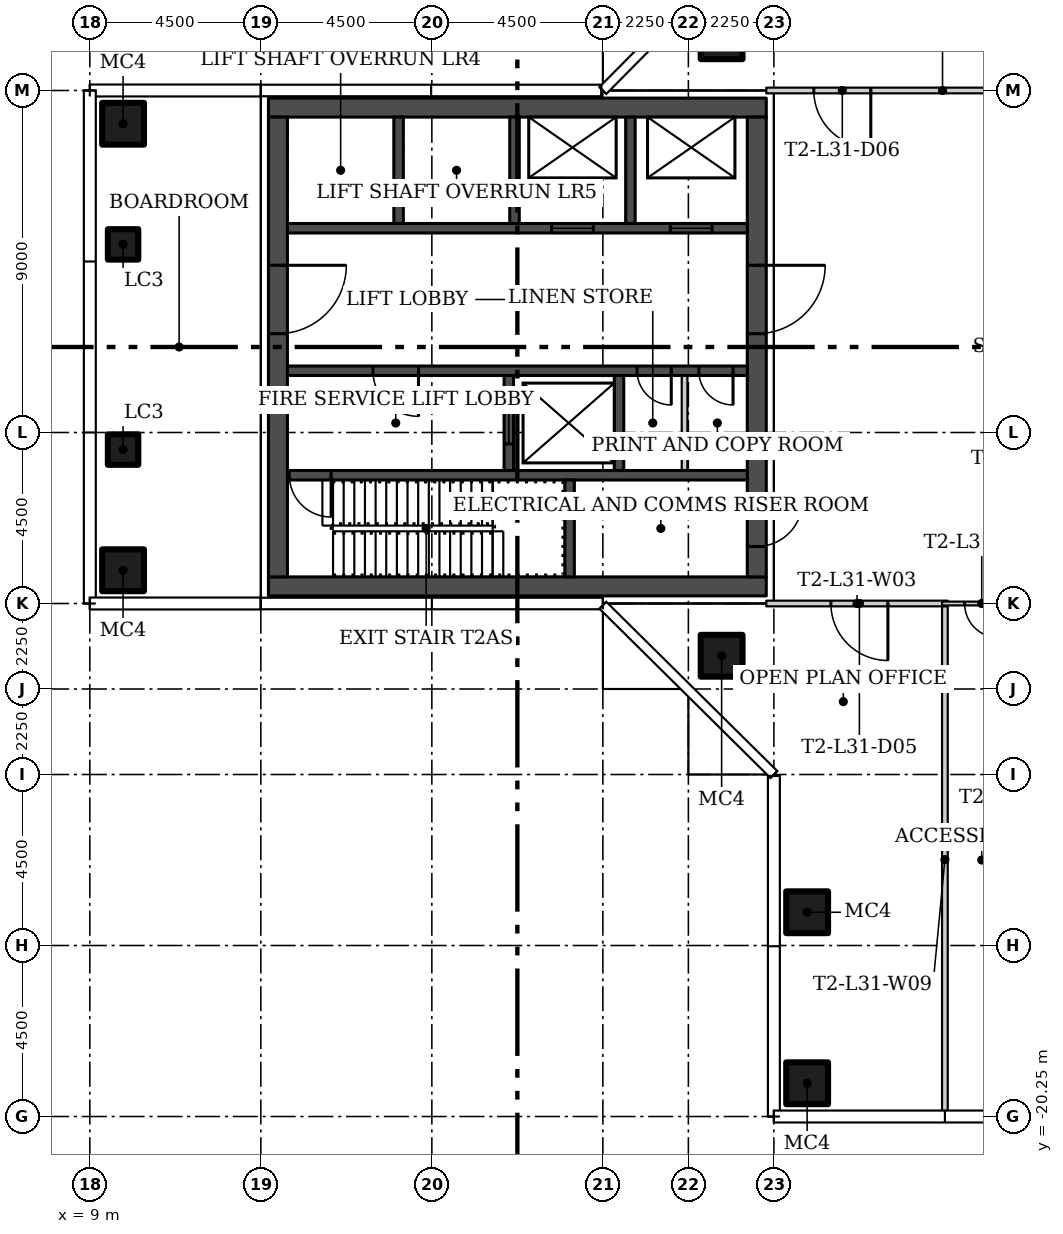
"""IFC4 building model, lengths in metres.
Left out: names, types, materials, properties, quantities, classifications, styles, units other than length and angle.
Written with IfcOpenShell. Run it as: python <this file> out.ifc"""

import sys

from ifc_helpers import new_model, si_unit, direction, frame, frame_2d, origin, origin_2d, place, context, subcontext, project, spatial, rectangle, hollow_rectangle, extrude, element, fill, save


model = new_model("IFC4")
c1 = context("Model", 3, precision=1e-05, world=origin(), true_north=direction((0.0, 1.0)))
c2 = subcontext(c1, "Body", "Model", "MODEL_VIEW")
j1 = project(units=[si_unit("LENGTHUNIT", "METRE"), si_unit("PLANEANGLEUNIT", "RADIAN")], contexts=[c1])
p1 = place(None, origin())
s1 = spatial("IfcSite", under=j1, at=p1, CompositionType="ELEMENT")
p2 = place(p1, origin())
s2 = spatial("IfcBuilding", under=s1, at=p2, CompositionType="ELEMENT")
p3 = place(p2, frame((0.0, 0.0, 133.5)))
s3 = spatial("IfcBuildingStorey", under=s2, at=p3, CompositionType="ELEMENT", Elevation=133.5)
for number, where in (
    (1, (25.625, 8.125, 0.0)),
    (2, (25.625, -8.125, 0.0)),
    (3, (27.875, -14.875, 0.0)),
    (4, (27.875, -19.375, 0.0)),
    (5, (9.875, -5.875, 0.0)),
    (6, (9.875, 5.875, 0.0)),
):
    element("IfcColumn", number, at=place(p3, frame(where)), inside=s3, PredefinedType="COLUMN", context=c2, shape_type="SweptSolid", body=[
        extrude(hollow_rectangle(XDim=1.1, YDim=1.1, WallThickness=0.04, at=origin_2d()), origin(), (0.0, 0.0, 1.0), 5.05),
    ])
for number, where in (
    (7, (9.875, -2.7, 0.0)),
    (8, (9.875, 2.7, 0.0)),
):
    element("IfcColumn", number, at=place(p3, frame(where)), inside=s3, PredefinedType="COLUMN", context=c2, shape_type="SweptSolid", body=[
        extrude(hollow_rectangle(XDim=0.8, YDim=0.8, WallThickness=0.03, at=origin_2d()), origin(), (0.0, 0.0, 1.0), 5.05),
    ])
p4 = place(p3, frame((36.075, 6.75, 0.0), z_axis=(0.0, 0.0, 1.0), x_axis=(-1.0, 0.0, 0.0)))
e9 = element("IfcWall", 9, at=p4, inside=s3, PredefinedType="PARTITIONING", context=c2, shape_type="SweptSolid", body=[
    extrude(rectangle(XDim=9.275, YDim=0.15, at=frame_2d((4.637, 0.0))), origin(), (0.0, 0.0, 1.0), 5.05),
])
p5 = place(p4, frame((6.525, 0.0, 0.0)))
e10 = element("IfcOpeningElement", 10, at=p5, cuts=e9, PredefinedType="OPENING", context=c2, shape_type="SweptSolid", body=[
    extrude(rectangle(XDim=1.5, YDim=2.1, at=frame_2d((0.75, 1.05))), frame((0.0, 0.085, 0.0), z_axis=(0.0, -1.0, 0.0), x_axis=(1.0, 0.0, 0.0)), (0.0, 0.0, 1.0), 0.17),
])
p6 = place(p4, frame((1.125, 0.0, 0.0)))
e11 = element("IfcOpeningElement", 11, at=p6, cuts=e9, PredefinedType="OPENING", context=c2, shape_type="SweptSolid", body=[
    extrude(rectangle(XDim=1.5, YDim=2.1, at=frame_2d((0.75, 1.05))), frame((0.0, 0.085, 0.0), z_axis=(0.0, -1.0, 0.0), x_axis=(1.0, 0.0, 0.0)), (0.0, 0.0, 1.0), 0.17),
])
p7 = place(p3, frame((31.575, -6.75, 0.0), z_axis=(0.0, 0.0, 1.0), x_axis=(-1.0, 0.0, 0.0)))
e12 = element("IfcWall", 12, at=p7, inside=s3, PredefinedType="PARTITIONING", context=c2, shape_type="SweptSolid", body=[
    extrude(rectangle(XDim=4.775, YDim=0.15, at=frame_2d((2.387, 0.0))), origin(), (0.0, 0.0, 1.0), 5.05),
])
p8 = place(p7, frame((1.575, 0.0, 0.0)))
e13 = element("IfcOpeningElement", 13, at=p8, cuts=e12, PredefinedType="OPENING", context=c2, shape_type="SweptSolid", body=[
    extrude(rectangle(XDim=1.5, YDim=2.1, at=frame_2d((0.75, 1.05))), frame((0.0, 0.085, 0.0), z_axis=(0.0, -1.0, 0.0), x_axis=(1.0, 0.0, 0.0)), (0.0, 0.0, 1.0), 0.17),
])
p9 = place(p3, frame((36.075, -6.75, 0.0), z_axis=(0.0, 0.0, 1.0), x_axis=(-1.0, 0.0, 0.0)))
e14 = element("IfcWall", 14, at=p9, inside=s3, PredefinedType="PARTITIONING", context=c2, shape_type="SweptSolid", body=[
    extrude(rectangle(XDim=4.65, YDim=0.1, at=frame_2d((2.325, 0.0))), origin(), (0.0, 0.0, 1.0), 5.05),
])
p10 = place(p9, frame((3.156, 0.0, 0.0)))
e15 = element("IfcOpeningElement", 15, at=p10, cuts=e14, PredefinedType="OPENING", context=c2, shape_type="SweptSolid", body=[
    extrude(rectangle(XDim=0.9, YDim=2.1, at=frame_2d((0.45, 1.05))), frame((0.0, 0.06, 0.0), z_axis=(0.0, -1.0, 0.0), x_axis=(1.0, 0.0, 0.0)), (0.0, 0.0, 1.0), 0.12),
])
p11 = place(p9, frame((0.906, 0.0, 0.0)))
e16 = element("IfcOpeningElement", 16, at=p11, cuts=e14, PredefinedType="OPENING", context=c2, shape_type="SweptSolid", body=[
    extrude(rectangle(XDim=0.9, YDim=2.1, at=frame_2d((0.45, 1.05))), frame((0.0, 0.06, 0.0), z_axis=(0.0, -1.0, 0.0), x_axis=(1.0, 0.0, 0.0)), (0.0, 0.0, 1.0), 0.12),
])
p12 = place(p3, frame((31.5, -6.825, 0.0), z_axis=(0.0, 0.0, 1.0), x_axis=(0.0, -1.0, 0.0)))
e17 = element("IfcWall", 17, at=p12, inside=s3, PredefinedType="PARTITIONING", context=c2, shape_type="SweptSolid", body=[
    extrude(rectangle(XDim=13.33, YDim=0.15, at=frame_2d((6.665, 0.0))), origin(), (0.0, 0.0, 1.0), 5.05),
])
for number, where in (
    (18, (13.7, -6.3, 0.0)),
    (19, (13.7, 6.3, 0.0)),
):
    element("IfcWall", number, at=place(p3, frame(where)), inside=s3, PredefinedType="SHEAR", context=c2, shape_type="SweptSolid", body=[
        extrude(rectangle(XDim=13.1, YDim=0.5, at=frame_2d((6.55, 0.0))), origin(), (0.0, 0.0, 1.0), 5.05),
    ])
p13 = place(p3, frame((13.95, 6.05, 0.0), z_axis=(0.0, 0.0, 1.0), x_axis=(0.0, -1.0, 0.0)))
e20 = element("IfcWall", 20, at=p13, inside=s3, PredefinedType="SHEAR", context=c2, shape_type="SweptSolid", body=[
    extrude(rectangle(XDim=12.1, YDim=0.5, at=frame_2d((6.05, 0.0))), origin(), (0.0, 0.0, 1.0), 5.05),
])
p14 = place(p13, frame((3.9, 0.0, 0.0)))
e21 = element("IfcOpeningElement", 21, at=p14, cuts=e20, PredefinedType="OPENING", context=c2, shape_type="SweptSolid", body=[
    extrude(rectangle(XDim=1.8, YDim=2.4, at=frame_2d((0.9, 1.2))), frame((0.0, 0.26, 0.0), z_axis=(0.0, -1.0, 0.0), x_axis=(1.0, 0.0, 0.0)), (0.0, 0.0, 1.0), 0.52),
])
p15 = place(p3, frame((26.55, 6.05, 0.0), z_axis=(0.0, 0.0, 1.0), x_axis=(0.0, -1.0, 0.0)))
e22 = element("IfcWall", 22, at=p15, inside=s3, PredefinedType="SHEAR", context=c2, shape_type="SweptSolid", body=[
    extrude(rectangle(XDim=12.1, YDim=0.5, at=frame_2d((6.05, 0.0))), origin(), (0.0, 0.0, 1.0), 5.05),
])
p16 = place(p15, frame((10.1, 0.0, 0.0)))
e23 = element("IfcOpeningElement", 23, at=p16, cuts=e22, PredefinedType="OPENING", context=c2, shape_type="SweptSolid", body=[
    extrude(rectangle(XDim=1.2, YDim=2.1, at=frame_2d((0.6, 1.05))), frame((0.0, 0.26, 0.0), z_axis=(0.0, -1.0, 0.0), x_axis=(1.0, 0.0, 0.0)), (0.0, 0.0, 1.0), 0.52),
])
p17 = place(p15, frame((3.9, 0.0, 0.0)))
e24 = element("IfcOpeningElement", 24, at=p17, cuts=e22, PredefinedType="OPENING", context=c2, shape_type="SweptSolid", body=[
    extrude(rectangle(XDim=1.8, YDim=2.4, at=frame_2d((0.9, 1.2))), frame((0.0, 0.26, 0.0), z_axis=(0.0, -1.0, 0.0), x_axis=(1.0, 0.0, 0.0)), (0.0, 0.0, 1.0), 0.52),
])
p18 = place(p3, frame((26.3, -3.375, 0.0), z_axis=(0.0, 0.0, 1.0), x_axis=(-1.0, 0.0, 0.0)))
e25 = element("IfcWall", 25, at=p18, inside=s3, PredefinedType="SHEAR", context=c2, shape_type="SweptSolid", body=[
    extrude(rectangle(XDim=12.1, YDim=0.25, at=frame_2d((6.05, 0.0))), origin(), (0.0, 0.0, 1.0), 5.05),
])
p19 = place(p18, frame((10.95, 0.0, 0.0)))
e26 = element("IfcOpeningElement", 26, at=p19, cuts=e25, PredefinedType="OPENING", context=c2, shape_type="SweptSolid", body=[
    extrude(rectangle(XDim=1.1, YDim=2.1, at=frame_2d((0.55, 1.05))), frame((0.0, 0.135, 0.0), z_axis=(0.0, -1.0, 0.0), x_axis=(1.0, 0.0, 0.0)), (0.0, 0.0, 1.0), 0.27),
])
p20 = place(p3, frame((21.625, -6.05, 0.0), z_axis=(0.0, 0.0, 1.0), x_axis=(0.0, 1.0, 0.0)))
e27 = element("IfcWall", 27, at=p20, inside=s3, PredefinedType="SHEAR", context=c2, shape_type="SweptSolid", body=[
    extrude(rectangle(XDim=2.55, YDim=0.25, at=frame_2d((1.275, 0.0))), origin(), (0.0, 0.0, 1.0), 5.05),
])
p21 = place(p3, frame((26.3, -0.625, 0.0), z_axis=(0.0, 0.0, 1.0), x_axis=(-1.0, 0.0, 0.0)))
e28 = element("IfcWall", 28, at=p21, inside=s3, PredefinedType="SHEAR", context=c2, shape_type="SweptSolid", body=[
    extrude(rectangle(XDim=12.1, YDim=0.25, at=frame_2d((6.05, 0.0))), origin(), (0.0, 0.0, 1.0), 5.05),
])
p22 = place(p21, frame((8.65, 0.0, 0.0)))
e29 = element("IfcOpeningElement", 29, at=p22, cuts=e28, PredefinedType="OPENING", context=c2, shape_type="SweptSolid", body=[
    extrude(rectangle(XDim=1.2, YDim=2.1, at=frame_2d((0.6, 1.05))), frame((0.0, 0.135, 0.0), z_axis=(0.0, -1.0, 0.0), x_axis=(1.0, 0.0, 0.0)), (0.0, 0.0, 1.0), 0.27),
])
p23 = place(p21, frame((2.0, 0.0, 0.0)))
e30 = element("IfcOpeningElement", 30, at=p23, cuts=e28, PredefinedType="OPENING", context=c2, shape_type="SweptSolid", body=[
    extrude(rectangle(XDim=0.9, YDim=2.1, at=frame_2d((0.45, 1.05))), frame((0.0, 0.135, 0.0), z_axis=(0.0, -1.0, 0.0), x_axis=(1.0, 0.0, 0.0)), (0.0, 0.0, 1.0), 0.27),
])
p24 = place(p21, frame((0.375, 0.0, 0.0)))
e31 = element("IfcOpeningElement", 31, at=p24, cuts=e28, PredefinedType="OPENING", context=c2, shape_type="SweptSolid", body=[
    extrude(rectangle(XDim=0.9, YDim=2.1, at=frame_2d((0.45, 1.05))), frame((0.0, 0.135, 0.0), z_axis=(0.0, -1.0, 0.0), x_axis=(1.0, 0.0, 0.0)), (0.0, 0.0, 1.0), 0.27),
])
p25 = place(p3, frame((20.025, -3.25, 0.0), z_axis=(0.0, 0.0, 1.0), x_axis=(0.0, 1.0, 0.0)))
e32 = element("IfcWall", 32, at=p25, inside=s3, PredefinedType="SHEAR", context=c2, shape_type="SweptSolid", body=[
    extrude(rectangle(XDim=2.5, YDim=0.25, at=frame_2d((1.25, 0.0))), origin(), (0.0, 0.0, 1.0), 5.05),
])
p26 = place(p25, frame((0.7, 0.0, 0.0)))
e33 = element("IfcOpeningElement", 33, at=p26, cuts=e32, PredefinedType="OPENING", context=c2, shape_type="SweptSolid", body=[
    extrude(rectangle(XDim=1.1, YDim=2.1, at=frame_2d((0.55, 1.05))), frame((0.0, 0.135, 0.0), z_axis=(0.0, -1.0, 0.0), x_axis=(1.0, 0.0, 0.0)), (0.0, 0.0, 1.0), 0.27),
])
p27 = place(p3, frame((22.925, -3.25, 0.0), z_axis=(0.0, 0.0, 1.0), x_axis=(0.0, 1.0, 0.0)))
e34 = element("IfcWall", 34, at=p27, inside=s3, PredefinedType="SHEAR", context=c2, shape_type="SweptSolid", body=[
    extrude(rectangle(XDim=2.5, YDim=0.25, at=frame_2d((1.25, 0.0))), origin(), (0.0, 0.0, 1.0), 5.05),
])
p28 = place(p3, frame((24.65, -3.25, 0.0), z_axis=(0.0, 0.0, 1.0), x_axis=(0.0, 1.0, 0.0)))
e35 = element("IfcWall", 35, at=p28, inside=s3, PredefinedType="PARTITIONING", context=c2, shape_type="SweptSolid", body=[
    extrude(rectangle(XDim=2.5, YDim=0.15, at=frame_2d((1.25, 0.0))), origin(), (0.0, 0.0, 1.0), 5.05),
])
p29 = place(p3, frame((14.2, 3.125, 0.0)))
e36 = element("IfcWall", 36, at=p29, inside=s3, PredefinedType="SHEAR", context=c2, shape_type="SweptSolid", body=[
    extrude(rectangle(XDim=12.1, YDim=0.25, at=frame_2d((6.05, 0.0))), origin(), (0.0, 0.0, 1.0), 5.05),
])
p30 = place(p29, frame((6.95, 0.0, 0.0)))
e37 = element("IfcOpeningElement", 37, at=p30, cuts=e36, PredefinedType="OPENING", context=c2, shape_type="SweptSolid", body=[
    extrude(rectangle(XDim=1.1, YDim=2.1, at=frame_2d((0.55, 1.05))), frame((0.0, 0.135, 0.0), z_axis=(0.0, -1.0, 0.0), x_axis=(1.0, 0.0, 0.0)), (0.0, 0.0, 1.0), 0.27),
])
p31 = place(p29, frame((10.075, 0.0, 0.0)))
e38 = element("IfcOpeningElement", 38, at=p31, cuts=e36, PredefinedType="OPENING", context=c2, shape_type="SweptSolid", body=[
    extrude(rectangle(XDim=1.1, YDim=2.1, at=frame_2d((0.55, 1.05))), frame((0.0, 0.135, 0.0), z_axis=(0.0, -1.0, 0.0), x_axis=(1.0, 0.0, 0.0)), (0.0, 0.0, 1.0), 0.27),
])
for number, where, z_axis, x_axis in (
    (39, (17.125, 3.25, 0.0), (0.0, 0.0, 1.0), (0.0, 1.0, 0.0)),
    (40, (20.175, 3.25, 0.0), (0.0, 0.0, 1.0), (0.0, 1.0, 0.0)),
    (41, (23.225, 3.25, 0.0), (0.0, 0.0, 1.0), (0.0, 1.0, 0.0)),
):
    element("IfcWall", number, at=place(p3, frame(where, z_axis=z_axis, x_axis=x_axis)), inside=s3, PredefinedType="SHEAR", context=c2, shape_type="SweptSolid", body=[
        extrude(rectangle(XDim=2.8, YDim=0.25, at=frame_2d((1.4, 0.0))), origin(), (0.0, 0.0, 1.0), 5.05),
    ])
p32 = place(p10, origin())
e42 = element("IfcDoor", 42, at=p32, inside=s3, OperationType="SINGLE_SWING_RIGHT", PredefinedType="DOOR", context=c2, shape_type="SweptSolid", body=[
    extrude(rectangle(XDim=0.9, YDim=2.1, at=frame_2d((0.45, 1.05))), frame((0.0, 0.025, 0.0), z_axis=(0.0, -1.0, 0.0), x_axis=(1.0, 0.0, 0.0)), (0.0, 0.0, 1.0), 0.05),
])
fill(e15, e42)
p33 = place(p8, origin())
e43 = element("IfcDoor", 43, at=p33, inside=s3, OperationType="DOUBLE_DOOR_SINGLE_SWING", PredefinedType="DOOR", context=c2, shape_type="SweptSolid", body=[
    extrude(rectangle(XDim=1.5, YDim=2.1, at=frame_2d((0.75, 1.05))), frame((0.0, 0.025, 0.0), z_axis=(0.0, -1.0, 0.0), x_axis=(1.0, 0.0, 0.0)), (0.0, 0.0, 1.0), 0.05),
])
fill(e13, e43)
p34 = place(p5, origin())
e44 = element("IfcDoor", 44, at=p34, inside=s3, OperationType="DOUBLE_DOOR_SINGLE_SWING", PredefinedType="DOOR", context=c2, shape_type="SweptSolid", body=[
    extrude(rectangle(XDim=1.5, YDim=2.1, at=frame_2d((0.75, 1.05))), frame((0.0, 0.025, 0.0), z_axis=(0.0, -1.0, 0.0), x_axis=(1.0, 0.0, 0.0)), (0.0, 0.0, 1.0), 0.05),
])
fill(e10, e44)
p35 = place(p14, origin())
e45 = element("IfcDoor", 45, at=p35, inside=s3, OperationType="DOUBLE_DOOR_SINGLE_SWING", PredefinedType="DOOR", context=c2, shape_type="SweptSolid", body=[
    extrude(rectangle(XDim=1.8, YDim=2.4, at=frame_2d((0.9, 1.2))), frame((0.0, 0.025, 0.0), z_axis=(0.0, -1.0, 0.0), x_axis=(1.0, 0.0, 0.0)), (0.0, 0.0, 1.0), 0.05),
])
fill(e21, e45)
p36 = place(p16, origin())
e46 = element("IfcDoor", 46, at=p36, inside=s3, OperationType="SINGLE_SWING_RIGHT", PredefinedType="DOOR", context=c2, shape_type="SweptSolid", body=[
    extrude(rectangle(XDim=1.2, YDim=2.1, at=frame_2d((0.6, 1.05))), frame((0.0, 0.025, 0.0), z_axis=(0.0, -1.0, 0.0), x_axis=(1.0, 0.0, 0.0)), (0.0, 0.0, 1.0), 0.05),
])
fill(e23, e46)
p37 = place(p17, origin())
e47 = element("IfcDoor", 47, at=p37, inside=s3, OperationType="DOUBLE_DOOR_SINGLE_SWING", PredefinedType="DOOR", context=c2, shape_type="SweptSolid", body=[
    extrude(rectangle(XDim=1.8, YDim=2.4, at=frame_2d((0.9, 1.2))), frame((0.0, 0.025, 0.0), z_axis=(0.0, -1.0, 0.0), x_axis=(1.0, 0.0, 0.0)), (0.0, 0.0, 1.0), 0.05),
])
fill(e24, e47)
p38 = place(p19, origin())
e48 = element("IfcDoor", 48, at=p38, inside=s3, OperationType="SINGLE_SWING_RIGHT", PredefinedType="DOOR", context=c2, shape_type="SweptSolid", body=[
    extrude(rectangle(XDim=1.1, YDim=2.1, at=frame_2d((0.55, 1.05))), frame((0.0, 0.025, 0.0), z_axis=(0.0, -1.0, 0.0), x_axis=(1.0, 0.0, 0.0)), (0.0, 0.0, 1.0), 0.05),
])
fill(e26, e48)
p39 = place(p22, origin())
e49 = element("IfcDoor", 49, at=p39, inside=s3, OperationType="SINGLE_SWING_RIGHT", PredefinedType="DOOR", context=c2, shape_type="SweptSolid", body=[
    extrude(rectangle(XDim=1.2, YDim=2.1, at=frame_2d((0.6, 1.05))), frame((0.0, 0.025, 0.0), z_axis=(0.0, -1.0, 0.0), x_axis=(1.0, 0.0, 0.0)), (0.0, 0.0, 1.0), 0.05),
])
fill(e29, e49)
p40 = place(p23, origin())
e50 = element("IfcDoor", 50, at=p40, inside=s3, OperationType="SINGLE_SWING_LEFT", PredefinedType="DOOR", context=c2, shape_type="SweptSolid", body=[
    extrude(rectangle(XDim=0.9, YDim=2.1, at=frame_2d((0.45, 1.05))), frame((0.0, 0.025, 0.0), z_axis=(0.0, -1.0, 0.0), x_axis=(1.0, 0.0, 0.0)), (0.0, 0.0, 1.0), 0.05),
])
fill(e30, e50)
p41 = place(p24, origin())
e51 = element("IfcDoor", 51, at=p41, inside=s3, OperationType="SINGLE_SWING_LEFT", PredefinedType="DOOR", context=c2, shape_type="SweptSolid", body=[
    extrude(rectangle(XDim=0.9, YDim=2.1, at=frame_2d((0.45, 1.05))), frame((0.0, 0.025, 0.0), z_axis=(0.0, -1.0, 0.0), x_axis=(1.0, 0.0, 0.0)), (0.0, 0.0, 1.0), 0.05),
])
fill(e31, e51)
p42 = place(p26, origin())
e52 = element("IfcDoor", 52, at=p42, inside=s3, OperationType="SLIDING_TO_LEFT", PredefinedType="DOOR", context=c2, shape_type="SweptSolid", body=[
    extrude(rectangle(XDim=1.1, YDim=2.1, at=frame_2d((0.55, 1.05))), frame((0.0, 0.025, 0.0), z_axis=(0.0, -1.0, 0.0), x_axis=(1.0, 0.0, 0.0)), (0.0, 0.0, 1.0), 0.05),
])
fill(e33, e52)
p43 = place(p30, origin())
e53 = element("IfcDoor", 53, at=p43, inside=s3, OperationType="SLIDING_TO_LEFT", PredefinedType="DOOR", context=c2, shape_type="SweptSolid", body=[
    extrude(rectangle(XDim=1.1, YDim=2.1, at=frame_2d((0.55, 1.05))), frame((0.0, 0.025, 0.0), z_axis=(0.0, -1.0, 0.0), x_axis=(1.0, 0.0, 0.0)), (0.0, 0.0, 1.0), 0.05),
])
fill(e37, e53)
p44 = place(p31, origin())
e54 = element("IfcDoor", 54, at=p44, inside=s3, OperationType="SLIDING_TO_LEFT", PredefinedType="DOOR", context=c2, shape_type="SweptSolid", body=[
    extrude(rectangle(XDim=1.1, YDim=2.1, at=frame_2d((0.55, 1.05))), frame((0.0, 0.025, 0.0), z_axis=(0.0, -1.0, 0.0), x_axis=(1.0, 0.0, 0.0)), (0.0, 0.0, 1.0), 0.05),
])
fill(e38, e54)
save(model, sys.argv[1])
